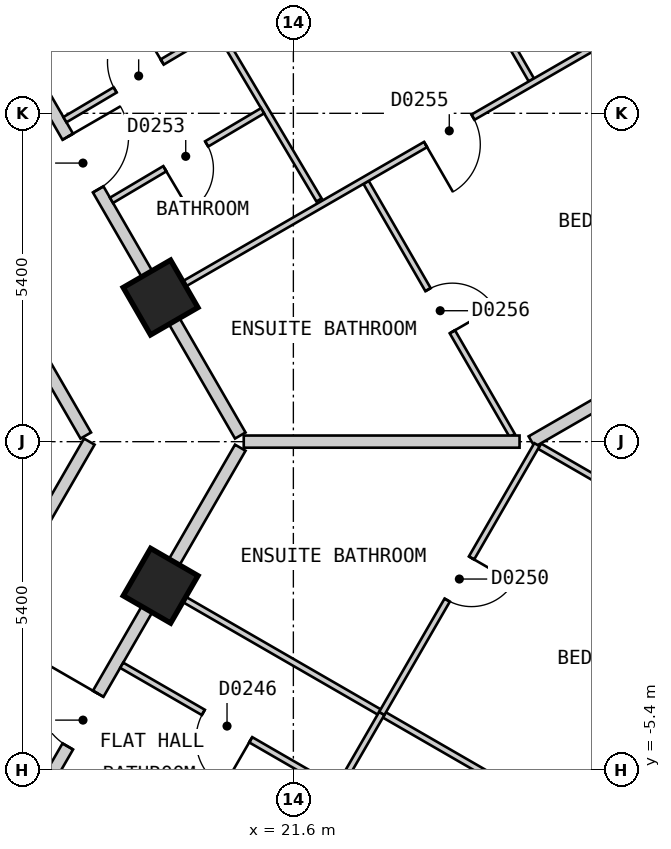
"""IFC4 building model, lengths in metres.
Left out: names, types, materials, properties, quantities, classifications, styles, units other than length and angle.
Written with IfcOpenShell. Run it as: python <this file> out.ifc"""

import sys

from ifc_helpers import new_model, si_unit, direction, frame, frame_2d, origin, origin_2d, place, context, subcontext, project, spatial, polyline, rectangle, outline, extrude, element, fill, save


model = new_model("IFC4")
c1 = context("Model", 3, precision=1e-05, world=origin(), true_north=direction((0.0, 1.0)))
c2 = subcontext(c1, "Body", "Model", "MODEL_VIEW")
j1 = project(units=[si_unit("LENGTHUNIT", "METRE"), si_unit("PLANEANGLEUNIT", "RADIAN")], contexts=[c1])
p1 = place(None, origin())
s1 = spatial("IfcSite", under=j1, at=p1, CompositionType="ELEMENT")
p2 = place(p1, origin())
s2 = spatial("IfcBuilding", under=s1, at=p2, CompositionType="ELEMENT")
p3 = place(p2, frame((0.0, 0.0, 41.4)))
s3 = spatial("IfcBuildingStorey", under=s2, at=p3, CompositionType="ELEMENT", Elevation=41.4)
for number, where, z_axis, x_axis in (
    (1, (19.417, -2.369, 0.0), (0.0, 0.0, 1.0), (0.5, 0.866, 0.0)),
    (2, (19.416, 2.371, 0.0), (0.0, 0.0, 1.0), (-0.5, 0.866, 0.0)),
):
    element("IfcColumn", number, at=place(p3, frame(where, z_axis=z_axis, x_axis=x_axis)), inside=s3, PredefinedType="COLUMN", context=c2, shape_type="SweptSolid", body=[
        extrude(rectangle(XDim=0.9, YDim=0.9, at=origin_2d()), origin(), (0.0, 0.0, 1.0), 3.0),
    ])
p4 = place(p3, frame((17.71, -25.825, 0.0), z_axis=(0.0, 0.0, 1.0), x_axis=(0.500001938803, 0.866024284413, 0.0)))
e3 = element("IfcWall", 3, at=p4, inside=s3, PredefinedType="SOLIDWALL", context=c2, shape_type="SweptSolid", body=[
    extrude(outline(polyline([(0.0, -0.15), (27.02, -0.15), (26.94, 0.15), (0.08, 0.15), (0.0, -0.15)])), origin(), (0.0, 0.0, 1.0), 2.7),
])
p5 = place(p4, frame((1.277, 0.0, 0.15)))
e4 = element("IfcOpeningElement", 4, at=p5, cuts=e3, PredefinedType="OPENING", context=c2, shape_type="SweptSolid", body=[
    extrude(rectangle(XDim=1.5, YDim=2.1, at=frame_2d((0.75, 1.05))), frame((0.0, 0.16, 0.0), z_axis=(0.0, -1.0, 0.0), x_axis=(1.0, 0.0, 0.0)), (0.0, 0.0, 1.0), 0.32),
])
p6 = place(p4, frame((3.829, 0.0, 0.15)))
e5 = element("IfcOpeningElement", 5, at=p6, cuts=e3, PredefinedType="OPENING", context=c2, shape_type="SweptSolid", body=[
    extrude(rectangle(XDim=1.5, YDim=2.1, at=frame_2d((0.75, 1.05))), frame((0.0, 0.16, 0.0), z_axis=(0.0, -1.0, 0.0), x_axis=(1.0, 0.0, 0.0)), (0.0, 0.0, 1.0), 0.32),
])
p7 = place(p4, frame((6.382, 0.0, 0.15)))
e6 = element("IfcOpeningElement", 6, at=p7, cuts=e3, PredefinedType="OPENING", context=c2, shape_type="SweptSolid", body=[
    extrude(rectangle(XDim=1.5, YDim=2.1, at=frame_2d((0.75, 1.05))), frame((0.0, 0.16, 0.0), z_axis=(0.0, -1.0, 0.0), x_axis=(1.0, 0.0, 0.0)), (0.0, 0.0, 1.0), 0.32),
])
p8 = place(p4, frame((8.933, 0.0, 0.15)))
e7 = element("IfcOpeningElement", 7, at=p8, cuts=e3, PredefinedType="OPENING", context=c2, shape_type="SweptSolid", body=[
    extrude(rectangle(XDim=1.5, YDim=2.1, at=frame_2d((0.75, 1.05))), frame((0.0, 0.16, 0.0), z_axis=(0.0, -1.0, 0.0), x_axis=(1.0, 0.0, 0.0)), (0.0, 0.0, 1.0), 0.32),
])
p9 = place(p4, frame((11.485, 0.0, 0.15)))
e8 = element("IfcOpeningElement", 8, at=p9, cuts=e3, PredefinedType="OPENING", context=c2, shape_type="SweptSolid", body=[
    extrude(rectangle(XDim=1.5, YDim=2.1, at=frame_2d((0.75, 1.05))), frame((0.0, 0.16, 0.0), z_axis=(0.0, -1.0, 0.0), x_axis=(1.0, 0.0, 0.0)), (0.0, 0.0, 1.0), 0.32),
])
p10 = place(p4, frame((14.037, 0.0, 0.15)))
e9 = element("IfcOpeningElement", 9, at=p10, cuts=e3, PredefinedType="OPENING", context=c2, shape_type="SweptSolid", body=[
    extrude(rectangle(XDim=1.5, YDim=2.1, at=frame_2d((0.75, 1.05))), frame((0.0, 0.16, 0.0), z_axis=(0.0, -1.0, 0.0), x_axis=(1.0, 0.0, 0.0)), (0.0, 0.0, 1.0), 0.32),
])
p11 = place(p4, frame((16.589, 0.0, 0.15)))
e10 = element("IfcOpeningElement", 10, at=p11, cuts=e3, PredefinedType="OPENING", context=c2, shape_type="SweptSolid", body=[
    extrude(rectangle(XDim=1.5, YDim=2.1, at=frame_2d((0.75, 1.05))), frame((0.0, 0.16, 0.0), z_axis=(0.0, -1.0, 0.0), x_axis=(1.0, 0.0, 0.0)), (0.0, 0.0, 1.0), 0.32),
])
p12 = place(p4, frame((19.141, 0.0, 0.15)))
e11 = element("IfcOpeningElement", 11, at=p12, cuts=e3, PredefinedType="OPENING", context=c2, shape_type="SweptSolid", body=[
    extrude(rectangle(XDim=1.5, YDim=2.1, at=frame_2d((0.75, 1.05))), frame((0.0, 0.16, 0.0), z_axis=(0.0, -1.0, 0.0), x_axis=(1.0, 0.0, 0.0)), (0.0, 0.0, 1.0), 0.32),
])
p13 = place(p4, frame((21.693, 0.0, 0.15)))
e12 = element("IfcOpeningElement", 12, at=p13, cuts=e3, PredefinedType="OPENING", context=c2, shape_type="SweptSolid", body=[
    extrude(rectangle(XDim=1.5, YDim=2.1, at=frame_2d((0.75, 1.05))), frame((0.0, 0.16, 0.0), z_axis=(0.0, -1.0, 0.0), x_axis=(1.0, 0.0, 0.0)), (0.0, 0.0, 1.0), 0.32),
])
p14 = place(p4, frame((24.244, 0.0, 0.15)))
e13 = element("IfcOpeningElement", 13, at=p14, cuts=e3, PredefinedType="OPENING", context=c2, shape_type="SweptSolid", body=[
    extrude(rectangle(XDim=1.5, YDim=2.1, at=frame_2d((0.75, 1.05))), frame((0.0, 0.16, 0.0), z_axis=(0.0, -1.0, 0.0), x_axis=(1.0, 0.0, 0.0)), (0.0, 0.0, 1.0), 0.32),
])
p15 = place(p3, frame((31.22, 2.425, 0.0), z_axis=(0.0, 0.0, 1.0), x_axis=(-0.500001938803, 0.866024284413, 0.0)))
e14 = element("IfcWall", 14, at=p15, inside=s3, PredefinedType="SOLIDWALL", context=c2, shape_type="SweptSolid", body=[
    extrude(outline(polyline([(0.0, -0.15), (27.02, -0.15), (26.94, 0.15), (0.08, 0.15), (0.0, -0.15)])), origin(), (0.0, 0.0, 1.0), 2.7),
])
p16 = place(p15, frame((1.277, 0.0, 0.15)))
e15 = element("IfcOpeningElement", 15, at=p16, cuts=e14, PredefinedType="OPENING", context=c2, shape_type="SweptSolid", body=[
    extrude(rectangle(XDim=1.5, YDim=2.1, at=frame_2d((0.75, 1.05))), frame((0.0, 0.16, 0.0), z_axis=(0.0, -1.0, 0.0), x_axis=(1.0, 0.0, 0.0)), (0.0, 0.0, 1.0), 0.32),
])
p17 = place(p15, frame((3.829, 0.0, 0.15)))
e16 = element("IfcOpeningElement", 16, at=p17, cuts=e14, PredefinedType="OPENING", context=c2, shape_type="SweptSolid", body=[
    extrude(rectangle(XDim=1.5, YDim=2.1, at=frame_2d((0.75, 1.05))), frame((0.0, 0.16, 0.0), z_axis=(0.0, -1.0, 0.0), x_axis=(1.0, 0.0, 0.0)), (0.0, 0.0, 1.0), 0.32),
])
p18 = place(p15, frame((6.382, 0.0, 0.15)))
e17 = element("IfcOpeningElement", 17, at=p18, cuts=e14, PredefinedType="OPENING", context=c2, shape_type="SweptSolid", body=[
    extrude(rectangle(XDim=1.5, YDim=2.1, at=frame_2d((0.75, 1.05))), frame((0.0, 0.16, 0.0), z_axis=(0.0, -1.0, 0.0), x_axis=(1.0, 0.0, 0.0)), (0.0, 0.0, 1.0), 0.32),
])
p19 = place(p15, frame((8.933, 0.0, 0.15)))
e18 = element("IfcOpeningElement", 18, at=p19, cuts=e14, PredefinedType="OPENING", context=c2, shape_type="SweptSolid", body=[
    extrude(rectangle(XDim=1.5, YDim=2.1, at=frame_2d((0.75, 1.05))), frame((0.0, 0.16, 0.0), z_axis=(0.0, -1.0, 0.0), x_axis=(1.0, 0.0, 0.0)), (0.0, 0.0, 1.0), 0.32),
])
p20 = place(p15, frame((11.485, 0.0, 0.15)))
e19 = element("IfcOpeningElement", 19, at=p20, cuts=e14, PredefinedType="OPENING", context=c2, shape_type="SweptSolid", body=[
    extrude(rectangle(XDim=1.5, YDim=2.1, at=frame_2d((0.75, 1.05))), frame((0.0, 0.16, 0.0), z_axis=(0.0, -1.0, 0.0), x_axis=(1.0, 0.0, 0.0)), (0.0, 0.0, 1.0), 0.32),
])
p21 = place(p15, frame((14.037, 0.0, 0.15)))
e20 = element("IfcOpeningElement", 20, at=p21, cuts=e14, PredefinedType="OPENING", context=c2, shape_type="SweptSolid", body=[
    extrude(rectangle(XDim=1.5, YDim=2.1, at=frame_2d((0.75, 1.05))), frame((0.0, 0.16, 0.0), z_axis=(0.0, -1.0, 0.0), x_axis=(1.0, 0.0, 0.0)), (0.0, 0.0, 1.0), 0.32),
])
p22 = place(p15, frame((16.589, 0.0, 0.15)))
e21 = element("IfcOpeningElement", 21, at=p22, cuts=e14, PredefinedType="OPENING", context=c2, shape_type="SweptSolid", body=[
    extrude(rectangle(XDim=1.5, YDim=2.1, at=frame_2d((0.75, 1.05))), frame((0.0, 0.16, 0.0), z_axis=(0.0, -1.0, 0.0), x_axis=(1.0, 0.0, 0.0)), (0.0, 0.0, 1.0), 0.32),
])
p23 = place(p15, frame((19.141, 0.0, 0.15)))
e22 = element("IfcOpeningElement", 22, at=p23, cuts=e14, PredefinedType="OPENING", context=c2, shape_type="SweptSolid", body=[
    extrude(rectangle(XDim=1.5, YDim=2.1, at=frame_2d((0.75, 1.05))), frame((0.0, 0.16, 0.0), z_axis=(0.0, -1.0, 0.0), x_axis=(1.0, 0.0, 0.0)), (0.0, 0.0, 1.0), 0.32),
])
p24 = place(p15, frame((21.693, 0.0, 0.15)))
e23 = element("IfcOpeningElement", 23, at=p24, cuts=e14, PredefinedType="OPENING", context=c2, shape_type="SweptSolid", body=[
    extrude(rectangle(XDim=1.5, YDim=2.1, at=frame_2d((0.75, 1.05))), frame((0.0, 0.16, 0.0), z_axis=(0.0, -1.0, 0.0), x_axis=(1.0, 0.0, 0.0)), (0.0, 0.0, 1.0), 0.32),
])
p25 = place(p15, frame((24.244, 0.0, 0.15)))
e24 = element("IfcOpeningElement", 24, at=p25, cuts=e14, PredefinedType="OPENING", context=c2, shape_type="SweptSolid", body=[
    extrude(rectangle(XDim=1.5, YDim=2.1, at=frame_2d((0.75, 1.05))), frame((0.0, 0.16, 0.0), z_axis=(0.0, -1.0, 0.0), x_axis=(1.0, 0.0, 0.0)), (0.0, 0.0, 1.0), 0.32),
])
p26 = place(p3, frame((9.18, 15.7, 0.0), z_axis=(0.0, 0.0, 1.0), x_axis=(0.500003652032, -0.866023295272, 0.0)))
e25 = element("IfcWall", 25, at=p26, inside=s3, PredefinedType="PARTITIONING", context=c2, shape_type="SweptSolid", body=[
    extrude(rectangle(XDim=18.012, YDim=0.2, at=frame_2d((9.006, 0.0))), origin(), (0.0, 0.0, 1.0), 2.7),
])
p27 = place(p26, frame((8.556, 0.0, 0.0)))
e26 = element("IfcOpeningElement", 26, at=p27, cuts=e25, PredefinedType="OPENING", context=c2, shape_type="SweptSolid", body=[
    extrude(rectangle(XDim=0.9, YDim=2.1, at=frame_2d((0.45, 1.05))), frame((0.0, 0.11, 0.0), z_axis=(0.0, -1.0, 0.0), x_axis=(1.0, 0.0, 0.0)), (0.0, 0.0, 1.0), 0.22),
])
p28 = place(p3, frame((10.45, 17.9, 0.0), z_axis=(0.0, 0.0, 1.0), x_axis=(0.500034352617, -0.866005569383, 0.0)))
e27 = element("IfcWall", 27, at=p28, inside=s3, PredefinedType="PARTITIONING", context=c2, shape_type="SweptSolid", body=[
    extrude(rectangle(XDim=20.553, YDim=0.2, at=frame_2d((10.276, 0.0))), origin(), (0.0, 0.0, 1.0), 2.7),
])
p29 = place(p28, frame((14.879, 0.0, 0.0)))
e28 = element("IfcOpeningElement", 28, at=p29, cuts=e27, PredefinedType="OPENING", context=c2, shape_type="SweptSolid", body=[
    extrude(rectangle(XDim=1.0, YDim=2.1, at=frame_2d((0.5, 1.05))), frame((0.0, 0.11, 0.0), z_axis=(0.0, -1.0, 0.0), x_axis=(1.0, 0.0, 0.0)), (0.0, 0.0, 1.0), 0.22),
])
p30 = place(p28, frame((9.775, 0.0, 0.0)))
e29 = element("IfcOpeningElement", 29, at=p30, cuts=e27, PredefinedType="OPENING", context=c2, shape_type="SweptSolid", body=[
    extrude(rectangle(XDim=1.0, YDim=2.1, at=frame_2d((0.5, 1.05))), frame((0.0, 0.11, 0.0), z_axis=(0.0, -1.0, 0.0), x_axis=(1.0, 0.0, 0.0)), (0.0, 0.0, 1.0), 0.22),
])
p31 = place(p28, frame((4.671, 0.0, 0.0)))
e30 = element("IfcOpeningElement", 30, at=p31, cuts=e27, PredefinedType="OPENING", context=c2, shape_type="SweptSolid", body=[
    extrude(rectangle(XDim=1.0, YDim=2.1, at=frame_2d((0.5, 1.05))), frame((0.0, 0.11, 0.0), z_axis=(0.0, -1.0, 0.0), x_axis=(1.0, 0.0, 0.0)), (0.0, 0.0, 1.0), 0.22),
])
p32 = place(p3, frame((15.6, -4.579, 0.0), z_axis=(0.0, 0.0, 1.0), x_axis=(0.499927597274, 0.866067201483, 0.0)))
e31 = element("IfcWall", 31, at=p32, inside=s3, PredefinedType="PARTITIONING", context=c2, shape_type="SweptSolid", body=[
    extrude(rectangle(XDim=5.288, YDim=0.2, at=frame_2d((2.644, 0.0))), origin(), (0.0, 0.0, 1.0), 2.7),
])
p33 = place(p3, frame((16.864, -6.789, 0.0), z_axis=(0.0, 0.0, 1.0), x_axis=(0.500058020612, 0.865991902977, 0.0)))
e32 = element("IfcWall", 32, at=p33, inside=s3, PredefinedType="PARTITIONING", context=c2, shape_type="SweptSolid", body=[
    extrude(rectangle(XDim=7.725, YDim=0.2, at=frame_2d((3.863, 0.0))), origin(), (0.0, 0.0, 1.0), 2.7),
])
p34 = place(p33, frame((2.052, 0.0, 0.0)))
e33 = element("IfcOpeningElement", 33, at=p34, cuts=e32, PredefinedType="OPENING", context=c2, shape_type="SweptSolid", body=[
    extrude(rectangle(XDim=1.0, YDim=2.1, at=frame_2d((0.5, 1.05))), frame((0.0, 0.11, 0.0), z_axis=(0.0, -1.0, 0.0), x_axis=(1.0, 0.0, 0.0)), (0.0, 0.0, 1.0), 0.22),
])
p35 = place(p3, frame((20.381, 6.741, 0.0), z_axis=(0.0, 0.0, 1.0), x_axis=(0.510224755389, -0.860041103081, 0.0)))
e34 = element("IfcWall", 34, at=p35, inside=s3, PredefinedType="PARTITIONING", context=c2, shape_type="SweptSolid", body=[
    extrude(rectangle(XDim=3.216, YDim=0.1, at=frame_2d((1.608, 0.0))), origin(), (0.0, 0.0, 1.0), 2.7),
])
p36 = place(p3, frame((22.796, 4.264, 0.0), z_axis=(0.0, 0.0, 1.0), x_axis=(0.500099052605, -0.865968208183, 0.0)))
e35 = element("IfcWall", 35, at=p36, inside=s3, PredefinedType="PARTITIONING", context=c2, shape_type="SweptSolid", body=[
    extrude(rectangle(XDim=4.807, YDim=0.1, at=frame_2d((2.404, 0.0))), origin(), (0.0, 0.0, 1.0), 2.7),
])
p37 = place(p36, frame((2.037, 0.0, 0.0)))
e36 = element("IfcOpeningElement", 36, at=p37, cuts=e35, PredefinedType="OPENING", context=c2, shape_type="SweptSolid", body=[
    extrude(rectangle(XDim=0.8, YDim=2.1, at=frame_2d((0.4, 1.05))), frame((0.0, 0.06, 0.0), z_axis=(0.0, -1.0, 0.0), x_axis=(1.0, 0.0, 0.0)), (0.0, 0.0, 1.0), 0.12),
])
p38 = place(p3, frame((23.037, 10.24, 0.0), z_axis=(0.0, 0.0, 1.0), x_axis=(0.499907296314, -0.866078919667, 0.0)))
e37 = element("IfcWall", 37, at=p38, inside=s3, PredefinedType="PARTITIONING", context=c2, shape_type="SweptSolid", body=[
    extrude(rectangle(XDim=4.955, YDim=0.1, at=frame_2d((2.477, 0.0))), origin(), (0.0, 0.0, 1.0), 2.7),
])
p39 = place(p38, frame((2.002, 0.0, 0.0)))
e38 = element("IfcOpeningElement", 38, at=p39, cuts=e37, PredefinedType="OPENING", context=c2, shape_type="SweptSolid", body=[
    extrude(rectangle(XDim=0.9, YDim=2.1, at=frame_2d((0.45, 1.05))), frame((0.0, 0.06, 0.0), z_axis=(0.0, -1.0, 0.0), x_axis=(1.0, 0.0, 0.0)), (0.0, 0.0, 1.0), 0.12),
])
p40 = place(p3, frame((18.777, -3.677, 0.0), z_axis=(0.0, 0.0, 1.0), x_axis=(0.866000843773, -0.500042536776, 0.0)))
e39 = element("IfcWall", 39, at=p40, inside=s3, PredefinedType="PARTITIONING", context=c2, shape_type="SweptSolid", body=[
    extrude(rectangle(XDim=4.05, YDim=0.1, at=frame_2d((2.025, 0.0))), origin(), (0.0, 0.0, 1.0), 2.7),
])
p41 = place(p40, frame((1.55, 0.0, 0.0)))
e40 = element("IfcOpeningElement", 40, at=p41, cuts=e39, PredefinedType="OPENING", context=c2, shape_type="SweptSolid", body=[
    extrude(rectangle(XDim=0.9, YDim=2.1, at=frame_2d((0.45, 1.05))), frame((0.0, 0.06, 0.0), z_axis=(0.0, -1.0, 0.0), x_axis=(1.0, 0.0, 0.0)), (0.0, 0.0, 1.0), 0.12),
])
p42 = place(p3, frame((19.503, -2.419, 0.0), z_axis=(0.0, 0.0, 1.0), x_axis=(0.866047370643, -0.499961950354, 0.0)))
e41 = element("IfcWall", 41, at=p42, inside=s3, PredefinedType="PARTITIONING", context=c2, shape_type="SweptSolid", body=[
    extrude(rectangle(XDim=10.001, YDim=0.1, at=frame_2d((5.0, 0.0))), origin(), (0.0, 0.0, 1.0), 2.7),
])
p43 = place(p42, frame((6.6, 0.0, 0.0)))
e42 = element("IfcOpeningElement", 42, at=p43, cuts=e41, PredefinedType="OPENING", context=c2, shape_type="SweptSolid", body=[
    extrude(rectangle(XDim=0.9, YDim=2.1, at=frame_2d((0.45, 1.05))), frame((0.0, 0.06, 0.0), z_axis=(0.0, -1.0, 0.0), x_axis=(1.0, 0.0, 0.0)), (0.0, 0.0, 1.0), 0.12),
])
p44 = place(p3, frame((25.649, -0.074, 0.0), z_axis=(0.0, 0.0, 1.0), x_axis=(0.866059819573, -0.499940385368, 0.0)))
e43 = element("IfcWall", 43, at=p44, inside=s3, PredefinedType="PARTITIONING", context=c2, shape_type="SweptSolid", body=[
    extrude(rectangle(XDim=5.851, YDim=0.1, at=frame_2d((2.925, 0.0))), origin(), (0.0, 0.0, 1.0), 2.7),
])
p45 = place(p44, frame((2.45, 0.0, 0.0)))
e44 = element("IfcOpeningElement", 44, at=p45, cuts=e43, PredefinedType="OPENING", context=c2, shape_type="SweptSolid", body=[
    extrude(rectangle(XDim=0.9, YDim=2.1, at=frame_2d((0.45, 1.05))), frame((0.0, 0.06, 0.0), z_axis=(0.0, -1.0, 0.0), x_axis=(1.0, 0.0, 0.0)), (0.0, 0.0, 1.0), 0.12),
])
p46 = place(p3, frame((20.978, -8.065, 0.0), z_axis=(0.0, 0.0, 1.0), x_axis=(0.499965068118, 0.866045570776, 0.0)))
e45 = element("IfcWall", 45, at=p46, inside=s3, PredefinedType="PARTITIONING", context=c2, shape_type="SweptSolid", body=[
    extrude(rectangle(XDim=4.152, YDim=0.1, at=frame_2d((2.076, 0.0))), origin(), (0.0, 0.0, 1.0), 2.7),
])
p47 = place(p46, frame((1.15, 0.0, 0.0)))
e46 = element("IfcOpeningElement", 46, at=p47, cuts=e45, PredefinedType="OPENING", context=c2, shape_type="SweptSolid", body=[
    extrude(rectangle(XDim=0.9, YDim=2.1, at=frame_2d((0.45, 1.05))), frame((0.0, 0.06, 0.0), z_axis=(0.0, -1.0, 0.0), x_axis=(1.0, 0.0, 0.0)), (0.0, 0.0, 1.0), 0.12),
])
p48 = place(p3, frame((19.503, 2.421, 0.0), z_axis=(0.0, 0.0, 1.0), x_axis=(0.866065245018, 0.499930986609, 0.0)))
e47 = element("IfcWall", 47, at=p48, inside=s3, PredefinedType="PARTITIONING", context=c2, shape_type="SweptSolid", body=[
    extrude(rectangle(XDim=10.0, YDim=0.1, at=frame_2d((5.0, 0.0))), origin(), (0.0, 0.0, 1.0), 2.7),
])
p49 = place(p48, frame((4.932, 0.0, 0.0)))
e48 = element("IfcOpeningElement", 48, at=p49, cuts=e47, PredefinedType="OPENING", context=c2, shape_type="SweptSolid", body=[
    extrude(rectangle(XDim=0.9, YDim=2.1, at=frame_2d((0.45, 1.05))), frame((0.0, 0.06, 0.0), z_axis=(0.0, -1.0, 0.0), x_axis=(1.0, 0.0, 0.0)), (0.0, 0.0, 1.0), 0.12),
])
p50 = place(p3, frame((17.843, 5.295, 0.0), z_axis=(0.0, 0.0, 1.0), x_axis=(0.860078277555, 0.510162088436, 0.0)))
e49 = element("IfcWall", 49, at=p50, inside=s3, PredefinedType="PARTITIONING", context=c2, shape_type="SweptSolid", body=[
    extrude(rectangle(XDim=2.921, YDim=0.1, at=frame_2d((1.46, 0.0))), origin(), (0.0, 0.0, 1.0), 2.7),
])
p51 = place(p50, frame((0.96, 0.0, 0.0)))
e50 = element("IfcOpeningElement", 50, at=p51, cuts=e49, PredefinedType="OPENING", context=c2, shape_type="SweptSolid", body=[
    extrude(rectangle(XDim=0.9, YDim=2.1, at=frame_2d((0.45, 1.05))), frame((0.0, 0.06, 0.0), z_axis=(0.0, -1.0, 0.0), x_axis=(1.0, 0.0, 0.0)), (0.0, 0.0, 1.0), 0.12),
])
p52 = place(p3, frame((18.609, 3.969, 0.0), z_axis=(0.0, 0.0, 1.0), x_axis=(0.860254465905, 0.50986493691, 0.0)))
e51 = element("IfcWall", 51, at=p52, inside=s3, PredefinedType="PARTITIONING", context=c2, shape_type="SweptSolid", body=[
    extrude(rectangle(XDim=2.889, YDim=0.1, at=frame_2d((1.444, 0.0))), origin(), (0.0, 0.0, 1.0), 2.7),
])
p53 = place(p52, frame((1.019, 0.0, 0.0)))
e52 = element("IfcOpeningElement", 52, at=p53, cuts=e51, PredefinedType="OPENING", context=c2, shape_type="SweptSolid", body=[
    extrude(rectangle(XDim=0.8, YDim=2.1, at=frame_2d((0.4, 1.05))), frame((0.0, 0.06, 0.0), z_axis=(0.0, -1.0, 0.0), x_axis=(1.0, 0.0, 0.0)), (0.0, 0.0, 1.0), 0.12),
])
p54 = place(p3, frame((20.784, 0.001, 0.0), z_axis=(0.0, 0.0, 1.0), x_axis=(1.0, 0.0, 0.0)))
e53 = element("IfcWall", 53, at=p54, inside=s3, PredefinedType="PARTITIONING", context=c2, shape_type="SweptSolid", body=[
    extrude(rectangle(XDim=4.536, YDim=0.2, at=frame_2d((2.268, 0.0))), origin(), (0.0, 0.0, 1.0), 2.7),
])
p55 = place(p3, frame((25.519, 0.001, 0.0), z_axis=(0.0, 0.0, 1.0), x_axis=(0.86609140076, 0.499885672459, 0.0)))
e54 = element("IfcWall", 54, at=p55, inside=s3, PredefinedType="PARTITIONING", context=c2, shape_type="SweptSolid", body=[
    extrude(rectangle(XDim=6.0, YDim=0.2, at=frame_2d((3.0, 0.0))), origin(), (0.0, 0.0, 1.0), 2.7),
])
p56 = place(p3, frame((23.054, -4.469, 0.0), z_axis=(0.0, 0.0, 1.0), x_axis=(0.500023345639, 0.866011924754, 0.0)))
e55 = element("IfcWall", 55, at=p56, inside=s3, PredefinedType="PARTITIONING", context=c2, shape_type="SweptSolid", body=[
    extrude(rectangle(XDim=5.104, YDim=0.1, at=frame_2d((2.552, 0.0))), origin(), (0.0, 0.0, 1.0), 2.7),
])
p57 = place(p56, frame((2.152, 0.0, 0.0)))
e56 = element("IfcOpeningElement", 56, at=p57, cuts=e55, PredefinedType="OPENING", context=c2, shape_type="SweptSolid", body=[
    extrude(rectangle(XDim=0.8, YDim=2.1, at=frame_2d((0.4, 1.05))), frame((0.0, 0.06, 0.0), z_axis=(0.0, -1.0, 0.0), x_axis=(1.0, 0.0, 0.0)), (0.0, 0.0, 1.0), 0.12),
])
p58 = place(p34, origin())
e57 = element("IfcDoor", 57, at=p58, inside=s3, OperationType="SINGLE_SWING_RIGHT", PredefinedType="DOOR", context=c2, shape_type="SweptSolid", body=[
    extrude(rectangle(XDim=1.0, YDim=2.1, at=frame_2d((0.5, 1.05))), frame((0.0, 0.025, 0.0), z_axis=(0.0, -1.0, 0.0), x_axis=(1.0, 0.0, 0.0)), (0.0, 0.0, 1.0), 0.05),
])
fill(e33, e57)
p59 = place(p41, origin())
e58 = element("IfcDoor", 58, at=p59, inside=s3, OperationType="SINGLE_SWING_RIGHT", PredefinedType="DOOR", context=c2, shape_type="SweptSolid", body=[
    extrude(rectangle(XDim=0.9, YDim=2.1, at=frame_2d((0.45, 1.05))), frame((0.0, 0.025, 0.0), z_axis=(0.0, -1.0, 0.0), x_axis=(1.0, 0.0, 0.0)), (0.0, 0.0, 1.0), 0.05),
])
fill(e40, e58)
p60 = place(p57, origin())
e59 = element("IfcDoor", 59, at=p60, inside=s3, OperationType="SINGLE_SWING_RIGHT", PredefinedType="DOOR", context=c2, shape_type="SweptSolid", body=[
    extrude(rectangle(XDim=0.8, YDim=2.1, at=frame_2d((0.4, 1.05))), frame((0.0, 0.025, 0.0), z_axis=(0.0, -1.0, 0.0), x_axis=(1.0, 0.0, 0.0)), (0.0, 0.0, 1.0), 0.05),
])
fill(e56, e59)
p61 = place(p29, origin())
e60 = element("IfcDoor", 60, at=p61, inside=s3, OperationType="SINGLE_SWING_LEFT", PredefinedType="DOOR", context=c2, shape_type="SweptSolid", body=[
    extrude(rectangle(XDim=1.0, YDim=2.1, at=frame_2d((0.5, 1.05))), frame((0.0, 0.025, 0.0), z_axis=(0.0, -1.0, 0.0), x_axis=(1.0, 0.0, 0.0)), (0.0, 0.0, 1.0), 0.05),
])
fill(e28, e60)
p62 = place(p51, origin())
e61 = element("IfcDoor", 61, at=p62, inside=s3, OperationType="SINGLE_SWING_RIGHT", PredefinedType="DOOR", context=c2, shape_type="SweptSolid", body=[
    extrude(rectangle(XDim=0.9, YDim=2.1, at=frame_2d((0.45, 1.05))), frame((0.0, 0.025, 0.0), z_axis=(0.0, -1.0, 0.0), x_axis=(1.0, 0.0, 0.0)), (0.0, 0.0, 1.0), 0.05),
])
fill(e50, e61)
p63 = place(p53, origin())
e62 = element("IfcDoor", 62, at=p63, inside=s3, OperationType="SINGLE_SWING_LEFT", PredefinedType="DOOR", context=c2, shape_type="SweptSolid", body=[
    extrude(rectangle(XDim=0.8, YDim=2.1, at=frame_2d((0.4, 1.05))), frame((0.0, 0.025, 0.0), z_axis=(0.0, -1.0, 0.0), x_axis=(1.0, 0.0, 0.0)), (0.0, 0.0, 1.0), 0.05),
])
fill(e52, e62)
p64 = place(p49, origin())
e63 = element("IfcDoor", 63, at=p64, inside=s3, OperationType="SINGLE_SWING_LEFT", PredefinedType="DOOR", context=c2, shape_type="SweptSolid", body=[
    extrude(rectangle(XDim=0.9, YDim=2.1, at=frame_2d((0.45, 1.05))), frame((0.0, 0.025, 0.0), z_axis=(0.0, -1.0, 0.0), x_axis=(1.0, 0.0, 0.0)), (0.0, 0.0, 1.0), 0.05),
])
fill(e48, e63)
p65 = place(p37, origin())
e64 = element("IfcDoor", 64, at=p65, inside=s3, OperationType="SINGLE_SWING_RIGHT", PredefinedType="DOOR", context=c2, shape_type="SweptSolid", body=[
    extrude(rectangle(XDim=0.8, YDim=2.1, at=frame_2d((0.4, 1.05))), frame((0.0, 0.025, 0.0), z_axis=(0.0, -1.0, 0.0), x_axis=(1.0, 0.0, 0.0)), (0.0, 0.0, 1.0), 0.05),
])
fill(e36, e64)
save(model, sys.argv[1])
